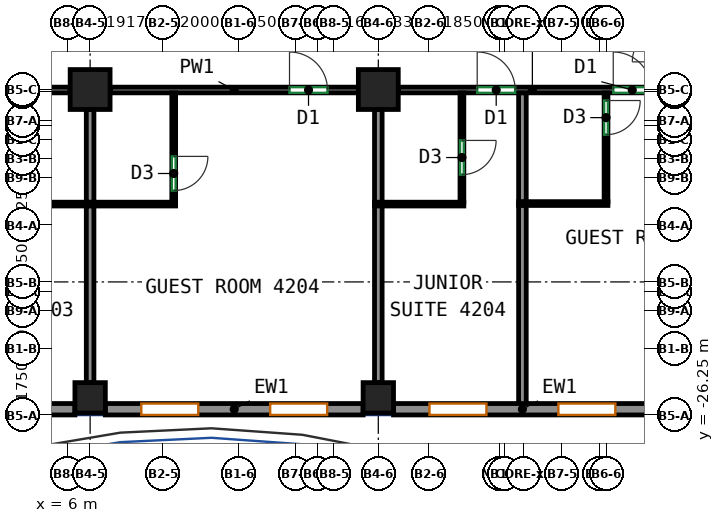
"""IFC4 building model, lengths in metres.
Left out: names, types, materials, properties, quantities, classifications, styles, units other than length and angle.
Written with IfcOpenShell. Run it as: python <this file> out.ifc"""

import sys

from ifc_helpers import new_model, si_unit, direction, frame, frame_2d, origin, origin_2d, place, context, subcontext, project, spatial, rectangle, extrude, source, transform, mapped, element, fill, save


model = new_model("IFC4")
c1 = context("Model", 3, precision=1e-05, world=origin(), true_north=direction((0.0, 1.0)))
c2 = subcontext(c1, "Body", "Model", "MODEL_VIEW")
j1 = project(units=[si_unit("LENGTHUNIT", "METRE"), si_unit("PLANEANGLEUNIT", "RADIAN")], contexts=[c1])
p1 = place(None, origin())
s1 = spatial("IfcSite", under=j1, at=p1, CompositionType="ELEMENT")
p2 = place(p1, origin())
s2 = spatial("IfcBuilding", under=s1, at=p2, CompositionType="ELEMENT")
p3 = place(p2, frame((0.0, 0.0, 178.7)))
s3 = spatial("IfcBuildingStorey", under=s2, at=p3, CompositionType="ELEMENT", Elevation=178.7)
m1 = source(origin(), c2, "Body", "SweptSolid", [
    extrude(rectangle(XDim=0.8, YDim=0.8, at=origin_2d()), origin(), (0.0, 0.0, 1.0), 3.12),
])
p4 = place(p3, frame((6.583, -25.8, 0.0), z_axis=(0.0, 0.0, 1.0), x_axis=(1.0, 0.0, 0.0)))
e1 = element("IfcColumn", 1, at=p4, inside=s3, PredefinedType="COLUMN", context=c2, shape_type="MappedRepresentation", body=[
    mapped(m1, transform((0.0, 0.0, 0.0))),
])
m2 = source(origin(), c2, "Body", "SweptSolid", [
    extrude(rectangle(XDim=1.05, YDim=1.05, at=origin_2d()), origin(), (0.0, 0.0, 1.0), 3.12),
])
p5 = place(p3, frame((6.583, -17.688, 0.0), z_axis=(0.0, 0.0, 1.0), x_axis=(1.0, 0.0, 0.0)))
e2 = element("IfcColumn", 2, at=p5, inside=s3, PredefinedType="COLUMN", context=c2, shape_type="MappedRepresentation", body=[
    mapped(m2, transform((0.0, 0.0, 0.0))),
])
p6 = place(p3, frame((14.167, -25.8, 0.0), z_axis=(0.0, 0.0, 1.0), x_axis=(1.0, 0.0, 0.0)))
e3 = element("IfcColumn", 3, at=p6, inside=s3, PredefinedType="COLUMN", context=c2, shape_type="MappedRepresentation", body=[
    mapped(m1, transform((0.0, 0.0, 0.0))),
])
p7 = place(p3, frame((14.167, -17.688, 0.0), z_axis=(0.0, 0.0, 1.0), x_axis=(1.0, 0.0, 0.0)))
e4 = element("IfcColumn", 4, at=p7, inside=s3, PredefinedType="COLUMN", context=c2, shape_type="MappedRepresentation", body=[
    mapped(m2, transform((0.0, 0.0, 0.0))),
])
m3 = source(origin(), c2, "Body", "SweptSolid", [
    extrude(rectangle(XDim=6.783, YDim=0.3, at=frame_2d((3.392, 0.0))), origin(), (0.0, 0.0, 1.0), 3.12),
])
p8 = place(p3, frame((-0.6, -26.1, 0.0), z_axis=(0.0, 0.0, 1.0), x_axis=(1.0, 0.0, 0.0)))
e5 = element("IfcWall", 5, at=p8, inside=s3, PredefinedType="SOLIDWALL", context=c2, shape_type="MappedRepresentation", body=[
    mapped(m3, transform((0.0, 0.0, 0.0))),
])
p9 = place(p8, frame((0.946, 0.0, 0.85)))
e6 = element("IfcOpeningElement", 6, at=p9, cuts=e5, PredefinedType="OPENING", context=c2, shape_type="SweptSolid", body=[
    extrude(rectangle(XDim=1.5, YDim=1.95, at=frame_2d((0.75, 0.975))), frame((0.0, 0.16, 0.0), z_axis=(0.0, -1.0, 0.0), x_axis=(1.0, 0.0, 0.0)), (0.0, 0.0, 1.0), 0.32),
])
p10 = place(p8, frame((4.337, 0.0, 0.85)))
e7 = element("IfcOpeningElement", 7, at=p10, cuts=e5, PredefinedType="OPENING", context=c2, shape_type="SweptSolid", body=[
    extrude(rectangle(XDim=1.5, YDim=1.95, at=frame_2d((0.75, 0.975))), frame((0.0, 0.16, 0.0), z_axis=(0.0, -1.0, 0.0), x_axis=(1.0, 0.0, 0.0)), (0.0, 0.0, 1.0), 0.32),
])
m4 = source(origin(), c2, "Body", "SweptSolid", [
    extrude(rectangle(XDim=6.783, YDim=0.3, at=frame_2d((3.392, 0.0))), origin(), (0.0, 0.0, 1.0), 3.12),
])
p11 = place(p3, frame((6.983, -26.1, 0.0), z_axis=(0.0, 0.0, 1.0), x_axis=(1.0, 0.0, 0.0)))
e8 = element("IfcWall", 8, at=p11, inside=s3, PredefinedType="SOLIDWALL", context=c2, shape_type="MappedRepresentation", body=[
    mapped(m4, transform((0.0, 0.0, 0.0))),
])
p12 = place(p11, frame((0.946, 0.0, 0.85)))
e9 = element("IfcOpeningElement", 9, at=p12, cuts=e8, PredefinedType="OPENING", context=c2, shape_type="SweptSolid", body=[
    extrude(rectangle(XDim=1.5, YDim=1.95, at=frame_2d((0.75, 0.975))), frame((0.0, 0.16, 0.0), z_axis=(0.0, -1.0, 0.0), x_axis=(1.0, 0.0, 0.0)), (0.0, 0.0, 1.0), 0.32),
])
p13 = place(p11, frame((4.338, 0.0, 0.85)))
e10 = element("IfcOpeningElement", 10, at=p13, cuts=e8, PredefinedType="OPENING", context=c2, shape_type="SweptSolid", body=[
    extrude(rectangle(XDim=1.5, YDim=1.95, at=frame_2d((0.75, 0.975))), frame((0.0, 0.16, 0.0), z_axis=(0.0, -1.0, 0.0), x_axis=(1.0, 0.0, 0.0)), (0.0, 0.0, 1.0), 0.32),
])
p14 = place(p3, frame((14.567, -26.1, 0.0), z_axis=(0.0, 0.0, 1.0), x_axis=(1.0, 0.0, 0.0)))
e11 = element("IfcWall", 11, at=p14, inside=s3, PredefinedType="SOLIDWALL", context=c2, shape_type="MappedRepresentation", body=[
    mapped(m3, transform((0.0, 0.0, 0.0))),
])
p15 = place(p14, frame((0.946, 0.0, 0.85)))
e12 = element("IfcOpeningElement", 12, at=p15, cuts=e11, PredefinedType="OPENING", context=c2, shape_type="SweptSolid", body=[
    extrude(rectangle(XDim=1.5, YDim=1.95, at=frame_2d((0.75, 0.975))), frame((0.0, 0.16, 0.0), z_axis=(0.0, -1.0, 0.0), x_axis=(1.0, 0.0, 0.0)), (0.0, 0.0, 1.0), 0.32),
])
p16 = place(p14, frame((4.337, 0.0, 0.85)))
e13 = element("IfcOpeningElement", 13, at=p16, cuts=e11, PredefinedType="OPENING", context=c2, shape_type="SweptSolid", body=[
    extrude(rectangle(XDim=1.5, YDim=1.95, at=frame_2d((0.75, 0.975))), frame((0.0, 0.16, 0.0), z_axis=(0.0, -1.0, 0.0), x_axis=(1.0, 0.0, 0.0)), (0.0, 0.0, 1.0), 0.32),
])
p17 = place(p3, frame((-0.475, -17.7, 0.0), z_axis=(0.0, 0.0, 1.0), x_axis=(1.0, 0.0, 0.0)))
e14 = element("IfcWall", 14, at=p17, inside=s3, PredefinedType="PARTITIONING", context=c2, shape_type="SweptSolid", body=[
    extrude(rectangle(XDim=6.533, YDim=0.15, at=frame_2d((3.267, 0.0))), origin(), (0.0, 0.0, 1.0), 3.12),
])
p18 = place(p17, frame((1.926, 0.0, 0.0)))
e15 = element("IfcOpeningElement", 15, at=p18, cuts=e14, PredefinedType="OPENING", context=c2, shape_type="SweptSolid", body=[
    extrude(rectangle(XDim=1.0, YDim=2.1, at=frame_2d((0.5, 1.05))), frame((0.0, 0.085, 0.0), z_axis=(0.0, -1.0, 0.0), x_axis=(1.0, 0.0, 0.0)), (0.0, 0.0, 1.0), 0.17),
])
p19 = place(p17, frame((3.387, 0.0, 0.0)))
e16 = element("IfcOpeningElement", 16, at=p19, cuts=e14, PredefinedType="OPENING", context=c2, shape_type="SweptSolid", body=[
    extrude(rectangle(XDim=1.0, YDim=2.1, at=frame_2d((0.5, 1.05))), frame((0.0, 0.085, 0.0), z_axis=(0.0, -1.0, 0.0), x_axis=(1.0, 0.0, 0.0)), (0.0, 0.0, 1.0), 0.17),
])
p20 = place(p3, frame((7.108, -17.7, 0.0), z_axis=(0.0, 0.0, 1.0), x_axis=(1.0, 0.0, 0.0)))
e17 = element("IfcWall", 17, at=p20, inside=s3, PredefinedType="PARTITIONING", context=c2, shape_type="SweptSolid", body=[
    extrude(rectangle(XDim=6.534, YDim=0.15, at=frame_2d((3.267, 0.0))), origin(), (0.0, 0.0, 1.0), 3.12),
])
p21 = place(p20, frame((4.722, 0.0, 0.0)))
e18 = element("IfcOpeningElement", 18, at=p21, cuts=e17, PredefinedType="OPENING", context=c2, shape_type="SweptSolid", body=[
    extrude(rectangle(XDim=1.0, YDim=2.1, at=frame_2d((0.5, 1.05))), frame((0.0, 0.085, 0.0), z_axis=(0.0, -1.0, 0.0), x_axis=(1.0, 0.0, 0.0)), (0.0, 0.0, 1.0), 0.17),
])
p22 = place(p3, frame((14.692, -17.7, 0.0), z_axis=(0.0, 0.0, 1.0), x_axis=(1.0, 0.0, 0.0)))
e19 = element("IfcWall", 19, at=p22, inside=s3, PredefinedType="PARTITIONING", context=c2, shape_type="SweptSolid", body=[
    extrude(rectangle(XDim=7.058, YDim=0.15, at=frame_2d((3.529, 0.0))), origin(), (0.0, 0.0, 1.0), 2.52),
])
p23 = place(p22, frame((2.077, 0.0, 0.0)))
e20 = element("IfcOpeningElement", 20, at=p23, cuts=e19, PredefinedType="OPENING", context=c2, shape_type="SweptSolid", body=[
    extrude(rectangle(XDim=1.0, YDim=2.1, at=frame_2d((0.5, 1.05))), frame((0.0, 0.085, 0.0), z_axis=(0.0, -1.0, 0.0), x_axis=(1.0, 0.0, 0.0)), (0.0, 0.0, 1.0), 0.17),
])
p24 = place(p22, frame((5.657, 0.0, 0.0)))
e21 = element("IfcOpeningElement", 21, at=p24, cuts=e19, PredefinedType="OPENING", context=c2, shape_type="SweptSolid", body=[
    extrude(rectangle(XDim=1.0, YDim=2.1, at=frame_2d((0.5, 1.05))), frame((0.0, 0.085, 0.0), z_axis=(0.0, -1.0, 0.0), x_axis=(1.0, 0.0, 0.0)), (0.0, 0.0, 1.0), 0.17),
])
p25 = place(p3, frame((4.333, -20.702, 0.0), z_axis=(0.0, 0.0, 1.0), x_axis=(1.0, 0.0, 0.0)))
e22 = element("IfcWall", 22, at=p25, inside=s3, PredefinedType="PARTITIONING", context=c2, shape_type="SweptSolid", body=[
    extrude(rectangle(XDim=4.5, YDim=0.1, at=frame_2d((2.25, 0.0))), origin(), (0.0, 0.0, 1.0), 3.12),
])
p26 = place(p3, frame((6.583, -25.4, 0.0), z_axis=(0.0, 0.0, 1.0), x_axis=(0.0, 1.0, 0.0)))
e23 = element("IfcWall", 23, at=p26, inside=s3, PredefinedType="PARTITIONING", context=c2, shape_type="SweptSolid", body=[
    extrude(rectangle(XDim=4.648, YDim=0.2, at=frame_2d((2.324, 0.0))), origin(), (0.0, 0.0, 1.0), 3.12),
])
p27 = place(p3, frame((6.583, -20.652, 0.0), z_axis=(0.0, 0.0, 1.0), x_axis=(0.0, 1.0, 0.0)))
e24 = element("IfcWall", 24, at=p27, inside=s3, PredefinedType="PARTITIONING", context=c2, shape_type="SweptSolid", body=[
    extrude(rectangle(XDim=2.44, YDim=0.2, at=frame_2d((1.22, 0.0))), origin(), (0.0, 0.0, 1.0), 3.12),
])
p28 = place(p3, frame((8.783, -17.777, 0.0), z_axis=(0.0, 0.0, 1.0), x_axis=(0.0, -1.0, 0.0)))
e25 = element("IfcWall", 25, at=p28, inside=s3, PredefinedType="PARTITIONING", context=c2, shape_type="SweptSolid", body=[
    extrude(rectangle(XDim=2.875, YDim=0.1, at=frame_2d((1.438, 0.0))), origin(), (0.0, 0.0, 1.0), 3.12),
])
p29 = place(p28, frame((1.67, 0.0, 0.0)))
e26 = element("IfcOpeningElement", 26, at=p29, cuts=e25, PredefinedType="OPENING", context=c2, shape_type="SweptSolid", body=[
    extrude(rectangle(XDim=0.9, YDim=2.1, at=frame_2d((0.45, 1.05))), frame((0.0, 0.06, 0.0), z_axis=(0.0, -1.0, 0.0), x_axis=(1.0, 0.0, 0.0)), (0.0, 0.0, 1.0), 0.12),
])
p30 = place(p3, frame((14.167, -25.4, 0.0), z_axis=(0.0, 0.0, 1.0), x_axis=(0.0, 1.0, 0.0)))
e27 = element("IfcWall", 27, at=p30, inside=s3, PredefinedType="PARTITIONING", context=c2, shape_type="SweptSolid", body=[
    extrude(rectangle(XDim=4.658, YDim=0.2, at=frame_2d((2.329, 0.0))), origin(), (0.0, 0.0, 1.0), 3.12),
])
p31 = place(p3, frame((14.167, -20.662, 0.0), z_axis=(0.0, 0.0, 1.0), x_axis=(0.0, 1.0, 0.0)))
e28 = element("IfcWall", 28, at=p31, inside=s3, PredefinedType="PARTITIONING", context=c2, shape_type="SweptSolid", body=[
    extrude(rectangle(XDim=2.45, YDim=0.2, at=frame_2d((1.225, 0.0))), origin(), (0.0, 0.0, 1.0), 3.12),
])
p32 = place(p3, frame((16.367, -17.777, 0.0), z_axis=(0.0, 0.0, 1.0), x_axis=(0.0, -1.0, 0.0)))
e29 = element("IfcWall", 29, at=p32, inside=s3, PredefinedType="PARTITIONING", context=c2, shape_type="SweptSolid", body=[
    extrude(rectangle(XDim=2.875, YDim=0.1, at=frame_2d((1.438, 0.0))), origin(), (0.0, 0.0, 1.0), 3.12),
])
p33 = place(p32, frame((1.25, 0.0, 0.0)))
e30 = element("IfcOpeningElement", 30, at=p33, cuts=e29, PredefinedType="OPENING", context=c2, shape_type="SweptSolid", body=[
    extrude(rectangle(XDim=0.9, YDim=2.1, at=frame_2d((0.45, 1.05))), frame((0.0, 0.06, 0.0), z_axis=(0.0, -1.0, 0.0), x_axis=(1.0, 0.0, 0.0)), (0.0, 0.0, 1.0), 0.12),
])
p34 = place(p3, frame((14.067, -20.702, 0.0), z_axis=(0.0, 0.0, 1.0), x_axis=(1.0, 0.0, 0.0)))
e31 = element("IfcWall", 31, at=p34, inside=s3, PredefinedType="PARTITIONING", context=c2, shape_type="SweptSolid", body=[
    extrude(rectangle(XDim=2.35, YDim=0.1, at=frame_2d((1.175, 0.0))), origin(), (0.0, 0.0, 1.0), 3.12),
])
p35 = place(p3, frame((17.959, -26.0, 0.0), z_axis=(0.0, 0.0, 1.0), x_axis=(0.0, 1.0, 0.0)))
e32 = element("IfcWall", 32, at=p35, inside=s3, PredefinedType="PARTITIONING", context=c2, shape_type="SweptSolid", body=[
    extrude(rectangle(XDim=5.272, YDim=0.2, at=frame_2d((2.636, 0.0))), origin(), (0.0, 0.0, 1.0), 3.12),
])
p36 = place(p3, frame((17.959, -20.648, 0.0), z_axis=(0.0, 0.0, 1.0), x_axis=(0.0, 1.0, 0.0)))
e33 = element("IfcWall", 33, at=p36, inside=s3, PredefinedType="PARTITIONING", context=c2, shape_type="SweptSolid", body=[
    extrude(rectangle(XDim=2.871, YDim=0.2, at=frame_2d((1.436, 0.0))), origin(), (0.0, 0.0, 1.0), 3.12),
])
p37 = place(p3, frame((17.859, -20.688, 0.0), z_axis=(0.0, 0.0, 1.0), x_axis=(1.0, 0.0, 0.0)))
e34 = element("IfcWall", 34, at=p37, inside=s3, PredefinedType="PARTITIONING", context=c2, shape_type="SweptSolid", body=[
    extrude(rectangle(XDim=2.35, YDim=0.1, at=frame_2d((1.175, 0.0))), origin(), (0.0, 0.0, 1.0), 3.12),
])
p38 = place(p3, frame((20.159, -17.777, 0.0), z_axis=(0.0, 0.0, 1.0), x_axis=(0.0, -1.0, 0.0)))
e35 = element("IfcWall", 35, at=p38, inside=s3, PredefinedType="PARTITIONING", context=c2, shape_type="SweptSolid", body=[
    extrude(rectangle(XDim=2.861, YDim=0.1, at=frame_2d((1.43, 0.0))), origin(), (0.0, 0.0, 1.0), 3.12),
])
p39 = place(p38, frame((0.2, 0.0, 0.0)))
e36 = element("IfcOpeningElement", 36, at=p39, cuts=e35, PredefinedType="OPENING", context=c2, shape_type="SweptSolid", body=[
    extrude(rectangle(XDim=0.9, YDim=2.1, at=frame_2d((0.45, 1.05))), frame((0.0, 0.06, 0.0), z_axis=(0.0, -1.0, 0.0), x_axis=(1.0, 0.0, 0.0)), (0.0, 0.0, 1.0), 0.12),
])
p40 = place(p12, origin())
e37 = element("IfcWindow", 37, at=p40, inside=s3, PartitioningType="SINGLE_PANEL", PredefinedType="WINDOW", context=c2, shape_type="SweptSolid", body=[
    extrude(rectangle(XDim=1.5, YDim=1.95, at=frame_2d((0.75, 0.975))), frame((0.0, 0.03, 0.0), z_axis=(0.0, -1.0, 0.0), x_axis=(1.0, 0.0, 0.0)), (0.0, 0.0, 1.0), 0.06),
])
fill(e9, e37)
p41 = place(p13, origin())
e38 = element("IfcWindow", 38, at=p41, inside=s3, PartitioningType="SINGLE_PANEL", PredefinedType="WINDOW", context=c2, shape_type="SweptSolid", body=[
    extrude(rectangle(XDim=1.5, YDim=1.95, at=frame_2d((0.75, 0.975))), frame((0.0, 0.03, 0.0), z_axis=(0.0, -1.0, 0.0), x_axis=(1.0, 0.0, 0.0)), (0.0, 0.0, 1.0), 0.06),
])
fill(e10, e38)
p42 = place(p15, origin())
e39 = element("IfcWindow", 39, at=p42, inside=s3, PartitioningType="SINGLE_PANEL", PredefinedType="WINDOW", context=c2, shape_type="SweptSolid", body=[
    extrude(rectangle(XDim=1.5, YDim=1.95, at=frame_2d((0.75, 0.975))), frame((0.0, 0.03, 0.0), z_axis=(0.0, -1.0, 0.0), x_axis=(1.0, 0.0, 0.0)), (0.0, 0.0, 1.0), 0.06),
])
fill(e12, e39)
p43 = place(p16, origin())
e40 = element("IfcWindow", 40, at=p43, inside=s3, PartitioningType="SINGLE_PANEL", PredefinedType="WINDOW", context=c2, shape_type="SweptSolid", body=[
    extrude(rectangle(XDim=1.5, YDim=1.95, at=frame_2d((0.75, 0.975))), frame((0.0, 0.03, 0.0), z_axis=(0.0, -1.0, 0.0), x_axis=(1.0, 0.0, 0.0)), (0.0, 0.0, 1.0), 0.06),
])
fill(e13, e40)
p44 = place(p29, origin())
e41 = element("IfcDoor", 41, at=p44, inside=s3, OperationType="SINGLE_SWING_LEFT", PredefinedType="DOOR", context=c2, shape_type="SweptSolid", body=[
    extrude(rectangle(XDim=0.9, YDim=2.1, at=frame_2d((0.45, 1.05))), frame((0.0, 0.025, 0.0), z_axis=(0.0, -1.0, 0.0), x_axis=(1.0, 0.0, 0.0)), (0.0, 0.0, 1.0), 0.05),
])
fill(e26, e41)
p45 = place(p33, origin())
e42 = element("IfcDoor", 42, at=p45, inside=s3, OperationType="SINGLE_SWING_LEFT", PredefinedType="DOOR", context=c2, shape_type="SweptSolid", body=[
    extrude(rectangle(XDim=0.9, YDim=2.1, at=frame_2d((0.45, 1.05))), frame((0.0, 0.025, 0.0), z_axis=(0.0, -1.0, 0.0), x_axis=(1.0, 0.0, 0.0)), (0.0, 0.0, 1.0), 0.05),
])
fill(e30, e42)
p46 = place(p39, origin())
e43 = element("IfcDoor", 43, at=p46, inside=s3, OperationType="SINGLE_SWING_LEFT", PredefinedType="DOOR", context=c2, shape_type="SweptSolid", body=[
    extrude(rectangle(XDim=0.9, YDim=2.1, at=frame_2d((0.45, 1.05))), frame((0.0, 0.025, 0.0), z_axis=(0.0, -1.0, 0.0), x_axis=(1.0, 0.0, 0.0)), (0.0, 0.0, 1.0), 0.05),
])
fill(e36, e43)
p47 = place(p21, origin())
e44 = element("IfcDoor", 44, at=p47, inside=s3, OperationType="SINGLE_SWING_LEFT", PredefinedType="DOOR", context=c2, shape_type="SweptSolid", body=[
    extrude(rectangle(XDim=1.0, YDim=2.1, at=frame_2d((0.5, 1.05))), frame((0.0, 0.025, 0.0), z_axis=(0.0, -1.0, 0.0), x_axis=(1.0, 0.0, 0.0)), (0.0, 0.0, 1.0), 0.05),
])
fill(e18, e44)
p48 = place(p23, origin())
e45 = element("IfcDoor", 45, at=p48, inside=s3, OperationType="SINGLE_SWING_LEFT", PredefinedType="DOOR", context=c2, shape_type="SweptSolid", body=[
    extrude(rectangle(XDim=1.0, YDim=2.1, at=frame_2d((0.5, 1.05))), frame((0.0, 0.025, 0.0), z_axis=(0.0, -1.0, 0.0), x_axis=(1.0, 0.0, 0.0)), (0.0, 0.0, 1.0), 0.05),
])
fill(e20, e45)
p49 = place(p24, origin())
e46 = element("IfcDoor", 46, at=p49, inside=s3, OperationType="SINGLE_SWING_LEFT", PredefinedType="DOOR", context=c2, shape_type="SweptSolid", body=[
    extrude(rectangle(XDim=1.0, YDim=2.1, at=frame_2d((0.5, 1.05))), frame((0.0, 0.025, 0.0), z_axis=(0.0, -1.0, 0.0), x_axis=(1.0, 0.0, 0.0)), (0.0, 0.0, 1.0), 0.05),
])
fill(e21, e46)
save(model, sys.argv[1])
